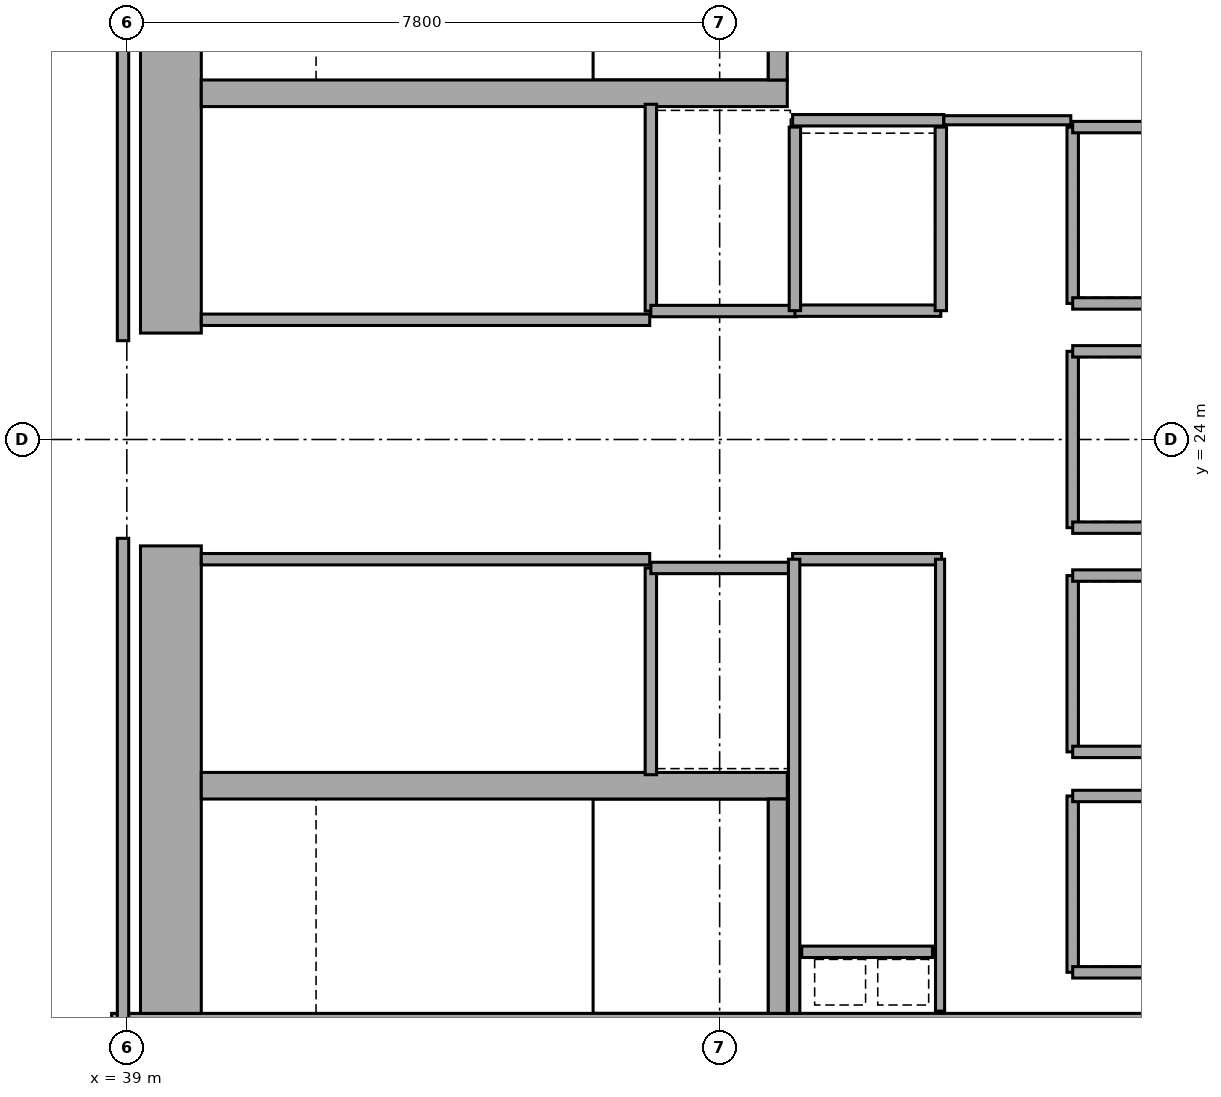
"""IFC4 building model, lengths in metres.
Left out: names, types, materials, properties, quantities, classifications, styles, units other than length and angle.
Written with IfcOpenShell. Run it as: python <this file> out.ifc"""

import sys

from ifc_helpers import new_model, si_unit, direction, frame, frame_2d, origin, place, context, subcontext, project, spatial, rectangle, extrude, element, fill, save


model = new_model("IFC4")
c1 = context("Model", 3, precision=1e-05, world=origin(), true_north=direction((0.0, 1.0)))
c2 = subcontext(c1, "Body", "Model", "MODEL_VIEW")
j1 = project(units=[si_unit("LENGTHUNIT", "METRE"), si_unit("PLANEANGLEUNIT", "RADIAN")], contexts=[c1])
p1 = place(None, origin())
s1 = spatial("IfcSite", under=j1, at=p1, CompositionType="ELEMENT")
p2 = place(p1, origin())
s2 = spatial("IfcBuilding", under=s1, at=p2, CompositionType="ELEMENT")
p3 = place(p2, frame((0.0, 0.0, 112.05)))
s3 = spatial("IfcBuildingStorey", under=s2, at=p3, CompositionType="ELEMENT", Elevation=112.05)
p4 = place(p3, frame((38.8, 16.05, 0.0), z_axis=(0.0, 0.0, 1.0), x_axis=(1.0, 0.0, 0.0)))
e1 = element("IfcWall", 1, at=p4, inside=s3, PredefinedType="SHEAR", context=c2, shape_type="SweptSolid", body=[
    extrude(rectangle(XDim=16.0, YDim=0.8, at=frame_2d((8.0, 0.0))), origin(), (0.0, 0.0, 1.0), 4.56),
])
for number, where, z_axis, x_axis in (
    (2, (39.58, 16.45, 0.0), (0.0, 0.0, 1.0), (0.0, 1.0, 0.0)),
    (3, (39.58, 25.4, 0.0), (0.0, 0.0, 1.0), (0.0, 1.0, 0.0)),
):
    element("IfcWall", number, at=place(p3, frame(where, z_axis=z_axis, x_axis=x_axis)), inside=s3, PredefinedType="SHEAR", context=c2, shape_type="SweptSolid", body=[
        extrude(rectangle(XDim=6.15, YDim=0.8, at=frame_2d((3.075, 0.0))), origin(), (0.0, 0.0, 1.0), 4.56),
    ])
p5 = place(p3, frame((39.98, 28.555, 0.0), z_axis=(0.0, 0.0, 1.0), x_axis=(1.0, 0.0, 0.0)))
e4 = element("IfcWall", 4, at=p5, inside=s3, PredefinedType="SHEAR", context=c2, shape_type="SweptSolid", body=[
    extrude(rectangle(XDim=7.71, YDim=0.35, at=frame_2d((3.855, 0.0))), origin(), (0.0, 0.0, 1.0), 4.56),
])
p6 = place(p5, frame((0.25, 0.0, 0.0)))
e5 = element("IfcOpeningElement", 5, at=p6, cuts=e4, PredefinedType="OPENING", context=c2, shape_type="SweptSolid", body=[
    extrude(rectangle(XDim=1.1, YDim=2.15, at=frame_2d((0.55, 1.075))), frame((0.0, 0.185, 0.0), z_axis=(0.0, -1.0, 0.0), x_axis=(1.0, 0.0, 0.0)), (0.0, 0.0, 1.0), 0.37),
])
p7 = place(p3, frame((39.98, 19.445, 0.0), z_axis=(0.0, 0.0, 1.0), x_axis=(1.0, 0.0, 0.0)))
e6 = element("IfcWall", 6, at=p7, inside=s3, PredefinedType="SHEAR", context=c2, shape_type="SweptSolid", body=[
    extrude(rectangle(XDim=7.71, YDim=0.35, at=frame_2d((3.855, 0.0))), origin(), (0.0, 0.0, 1.0), 4.56),
])
p8 = place(p7, frame((0.25, 0.0, 0.0)))
e7 = element("IfcOpeningElement", 7, at=p8, cuts=e6, PredefinedType="OPENING", context=c2, shape_type="SweptSolid", body=[
    extrude(rectangle(XDim=1.1, YDim=2.15, at=frame_2d((0.55, 1.075))), frame((0.0, 0.185, 0.0), z_axis=(0.0, -1.0, 0.0), x_axis=(1.0, 0.0, 0.0)), (0.0, 0.0, 1.0), 0.37),
])
for number, where, z_axis, x_axis in (
    (8, (47.565, 28.73, 0.0), (0.0, 0.0, 1.0), (0.0, 1.0, 0.0)),
    (9, (47.565, 16.45, 0.0), (0.0, 0.0, 1.0), (0.0, 1.0, 0.0)),
):
    element("IfcWall", number, at=place(p3, frame(where, z_axis=z_axis, x_axis=x_axis)), inside=s3, PredefinedType="SHEAR", context=c2, shape_type="SweptSolid", body=[
        extrude(rectangle(XDim=2.82, YDim=0.25, at=frame_2d((1.41, 0.0))), origin(), (0.0, 0.0, 1.0), 4.56),
    ])
p9 = place(p3, frame((39.98, 25.575, 0.0), z_axis=(0.0, 0.0, 1.0), x_axis=(1.0, 0.0, 0.0)))
e10 = element("IfcWall", 10, at=p9, inside=s3, PredefinedType="PARTITIONING", context=c2, shape_type="SweptSolid", body=[
    extrude(rectangle(XDim=5.9, YDim=0.15, at=frame_2d((2.95, 0.0))), origin(), (0.0, 0.0, 1.0), 4.56),
])
p10 = place(p9, frame((2.35, 0.0, 0.0)))
e11 = element("IfcOpeningElement", 11, at=p10, cuts=e10, PredefinedType="OPENING", context=c2, shape_type="SweptSolid", body=[
    extrude(rectangle(XDim=1.05, YDim=2.15, at=frame_2d((0.525, 1.075))), frame((0.0, 0.085, 0.0), z_axis=(0.0, -1.0, 0.0), x_axis=(1.0, 0.0, 0.0)), (0.0, 0.0, 1.0), 0.17),
])
p11 = place(p3, frame((39.98, 22.425, 0.0), z_axis=(0.0, 0.0, 1.0), x_axis=(1.0, 0.0, 0.0)))
e12 = element("IfcWall", 12, at=p11, inside=s3, PredefinedType="PARTITIONING", context=c2, shape_type="SweptSolid", body=[
    extrude(rectangle(XDim=5.9, YDim=0.15, at=frame_2d((2.95, 0.0))), origin(), (0.0, 0.0, 1.0), 4.56),
])
p12 = place(p11, frame((2.35, 0.0, 0.0)))
e13 = element("IfcOpeningElement", 13, at=p12, cuts=e12, PredefinedType="OPENING", context=c2, shape_type="SweptSolid", body=[
    extrude(rectangle(XDim=1.05, YDim=2.15, at=frame_2d((0.525, 1.075))), frame((0.0, 0.085, 0.0), z_axis=(0.0, -1.0, 0.0), x_axis=(1.0, 0.0, 0.0)), (0.0, 0.0, 1.0), 0.17),
])
p13 = place(p3, frame((45.895, 25.69, 0.0), z_axis=(0.0, 0.0, 1.0), x_axis=(0.0, 1.0, 0.0)))
e14 = element("IfcWall", 14, at=p13, inside=s3, PredefinedType="PARTITIONING", context=c2, shape_type="SweptSolid", body=[
    extrude(rectangle(XDim=2.72, YDim=0.15, at=frame_2d((1.36, 0.0))), origin(), (0.0, 0.0, 1.0), 4.56),
])
p14 = place(p13, frame((0.81, 0.0, 0.0)))
e15 = element("IfcOpeningElement", 15, at=p14, cuts=e14, PredefinedType="OPENING", context=c2, shape_type="SweptSolid", body=[
    extrude(rectangle(XDim=1.1, YDim=2.15, at=frame_2d((0.55, 1.075))), frame((0.0, 0.085, 0.0), z_axis=(0.0, -1.0, 0.0), x_axis=(1.0, 0.0, 0.0)), (0.0, 0.0, 1.0), 0.17),
])
p15 = place(p3, frame((45.895, 25.69, 0.0), z_axis=(0.0, 0.0, 1.0), x_axis=(1.0, 0.0, 0.0)))
e16 = element("IfcWall", 16, at=p15, inside=s3, PredefinedType="PARTITIONING", context=c2, shape_type="SweptSolid", body=[
    extrude(rectangle(XDim=1.915, YDim=0.15, at=frame_2d((0.958, 0.0))), origin(), (0.0, 0.0, 1.0), 4.56),
])
p16 = place(p3, frame((45.895, 19.59, 0.0), z_axis=(0.0, 0.0, 1.0), x_axis=(0.0, 1.0, 0.0)))
e17 = element("IfcWall", 17, at=p16, inside=s3, PredefinedType="PARTITIONING", context=c2, shape_type="SweptSolid", body=[
    extrude(rectangle(XDim=2.72, YDim=0.15, at=frame_2d((1.36, 0.0))), origin(), (0.0, 0.0, 1.0), 4.56),
])
p17 = place(p16, frame((0.81, 0.0, 0.0)))
e18 = element("IfcOpeningElement", 18, at=p17, cuts=e17, PredefinedType="OPENING", context=c2, shape_type="SweptSolid", body=[
    extrude(rectangle(XDim=1.1, YDim=2.15, at=frame_2d((0.55, 1.075))), frame((0.0, 0.085, 0.0), z_axis=(0.0, -1.0, 0.0), x_axis=(1.0, 0.0, 0.0)), (0.0, 0.0, 1.0), 0.17),
])
p18 = place(p3, frame((45.895, 22.31, 0.0), z_axis=(0.0, 0.0, 1.0), x_axis=(1.0, 0.0, 0.0)))
e19 = element("IfcWall", 19, at=p18, inside=s3, PredefinedType="PARTITIONING", context=c2, shape_type="SweptSolid", body=[
    extrude(rectangle(XDim=1.915, YDim=0.15, at=frame_2d((0.958, 0.0))), origin(), (0.0, 0.0, 1.0), 4.56),
])
p19 = place(p3, frame((47.79, 25.695, 0.0), z_axis=(0.0, 0.0, 1.0), x_axis=(1.0, 0.0, 0.0)))
e20 = element("IfcWall", 20, at=p19, inside=s3, PredefinedType="PARTITIONING", context=c2, shape_type="SweptSolid", body=[
    extrude(rectangle(XDim=1.92, YDim=0.15, at=frame_2d((0.96, 0.0))), origin(), (0.0, 0.0, 1.0), 4.56),
])
p20 = place(p19, frame((0.41, 0.0, 0.0)))
e21 = element("IfcOpeningElement", 21, at=p20, cuts=e20, PredefinedType="OPENING", context=c2, shape_type="SweptSolid", body=[
    extrude(rectangle(XDim=1.1, YDim=2.15, at=frame_2d((0.55, 1.075))), frame((0.0, 0.085, 0.0), z_axis=(0.0, -1.0, 0.0), x_axis=(1.0, 0.0, 0.0)), (0.0, 0.0, 1.0), 0.17),
])
for number, where, z_axis, x_axis in (
    (22, (47.79, 25.695, 0.0), (0.0, 0.0, 1.0), (0.0, 1.0, 0.0)),
    (23, (49.71, 25.695, 0.0), (0.0, 0.0, 1.0), (0.0, 1.0, 0.0)),
):
    element("IfcWall", number, at=place(p3, frame(where, z_axis=z_axis, x_axis=x_axis)), inside=s3, PredefinedType="PARTITIONING", context=c2, shape_type="SweptSolid", body=[
        extrude(rectangle(XDim=2.415, YDim=0.15, at=frame_2d((1.208, 0.0))), origin(), (0.0, 0.0, 1.0), 4.56),
    ])
p21 = place(p3, frame((51.445, 25.79, 0.0), z_axis=(0.0, 0.0, 1.0), x_axis=(0.0, 1.0, 0.0)))
e24 = element("IfcWall", 24, at=p21, inside=s3, PredefinedType="PARTITIONING", context=c2, shape_type="SweptSolid", body=[
    extrude(rectangle(XDim=2.32, YDim=0.15, at=frame_2d((1.16, 0.0))), origin(), (0.0, 0.0, 1.0), 4.56),
])
p22 = place(p21, frame((0.61, 0.0, 0.0)))
e25 = element("IfcOpeningElement", 25, at=p22, cuts=e24, PredefinedType="OPENING", context=c2, shape_type="SweptSolid", body=[
    extrude(rectangle(XDim=1.1, YDim=2.15, at=frame_2d((0.55, 1.075))), frame((0.0, 0.085, 0.0), z_axis=(0.0, -1.0, 0.0), x_axis=(1.0, 0.0, 0.0)), (0.0, 0.0, 1.0), 0.17),
])
for number, where, z_axis, x_axis in (
    (26, (51.445, 25.79, 0.0), (0.0, 0.0, 1.0), (1.0, 0.0, 0.0)),
    (27, (51.445, 28.11, 0.0), (0.0, 0.0, 1.0), (1.0, 0.0, 0.0)),
):
    element("IfcWall", number, at=place(p3, frame(where, z_axis=z_axis, x_axis=x_axis)), inside=s3, PredefinedType="PARTITIONING", context=c2, shape_type="SweptSolid", body=[
        extrude(rectangle(XDim=2.015, YDim=0.15, at=frame_2d((1.007, 0.0))), origin(), (0.0, 0.0, 1.0), 4.56),
    ])
p23 = place(p3, frame((51.445, 19.89, 0.0), z_axis=(0.0, 0.0, 1.0), x_axis=(0.0, 1.0, 0.0)))
e28 = element("IfcWall", 28, at=p23, inside=s3, PredefinedType="PARTITIONING", context=c2, shape_type="SweptSolid", body=[
    extrude(rectangle(XDim=2.32, YDim=0.15, at=frame_2d((1.16, 0.0))), origin(), (0.0, 0.0, 1.0), 4.56),
])
p24 = place(p23, frame((0.61, 0.0, 0.0)))
e29 = element("IfcOpeningElement", 29, at=p24, cuts=e28, PredefinedType="OPENING", context=c2, shape_type="SweptSolid", body=[
    extrude(rectangle(XDim=1.1, YDim=2.15, at=frame_2d((0.55, 1.075))), frame((0.0, 0.085, 0.0), z_axis=(0.0, -1.0, 0.0), x_axis=(1.0, 0.0, 0.0)), (0.0, 0.0, 1.0), 0.17),
])
for number, where, z_axis, x_axis in (
    (30, (51.445, 19.89, 0.0), (0.0, 0.0, 1.0), (1.0, 0.0, 0.0)),
    (31, (51.445, 22.21, 0.0), (0.0, 0.0, 1.0), (1.0, 0.0, 0.0)),
):
    element("IfcWall", number, at=place(p3, frame(where, z_axis=z_axis, x_axis=x_axis)), inside=s3, PredefinedType="PARTITIONING", context=c2, shape_type="SweptSolid", body=[
        extrude(rectangle(XDim=2.015, YDim=0.15, at=frame_2d((1.007, 0.0))), origin(), (0.0, 0.0, 1.0), 4.56),
    ])
p25 = place(p3, frame((51.445, 22.84, 0.0), z_axis=(0.0, 0.0, 1.0), x_axis=(0.0, 1.0, 0.0)))
e32 = element("IfcWall", 32, at=p25, inside=s3, PredefinedType="PARTITIONING", context=c2, shape_type="SweptSolid", body=[
    extrude(rectangle(XDim=2.32, YDim=0.15, at=frame_2d((1.16, 0.0))), origin(), (0.0, 0.0, 1.0), 4.56),
])
for number, where, z_axis, x_axis in (
    (33, (51.445, 22.84, 0.0), (0.0, 0.0, 1.0), (1.0, 0.0, 0.0)),
    (34, (51.445, 25.16, 0.0), (0.0, 0.0, 1.0), (1.0, 0.0, 0.0)),
):
    element("IfcWall", number, at=place(p3, frame(where, z_axis=z_axis, x_axis=x_axis)), inside=s3, PredefinedType="PARTITIONING", context=c2, shape_type="SweptSolid", body=[
        extrude(rectangle(XDim=2.015, YDim=0.15, at=frame_2d((1.007, 0.0))), origin(), (0.0, 0.0, 1.0), 4.56),
    ])
p26 = place(p3, frame((51.445, 16.99, 0.0), z_axis=(0.0, 0.0, 1.0), x_axis=(0.0, 1.0, 0.0)))
e35 = element("IfcWall", 35, at=p26, inside=s3, PredefinedType="PARTITIONING", context=c2, shape_type="SweptSolid", body=[
    extrude(rectangle(XDim=2.32, YDim=0.15, at=frame_2d((1.16, 0.0))), origin(), (0.0, 0.0, 1.0), 4.56),
])
p27 = place(p26, frame((0.61, 0.0, 0.0)))
e36 = element("IfcOpeningElement", 36, at=p27, cuts=e35, PredefinedType="OPENING", context=c2, shape_type="SweptSolid", body=[
    extrude(rectangle(XDim=1.1, YDim=2.15, at=frame_2d((0.55, 1.075))), frame((0.0, 0.085, 0.0), z_axis=(0.0, -1.0, 0.0), x_axis=(1.0, 0.0, 0.0)), (0.0, 0.0, 1.0), 0.17),
])
for number, where, z_axis, x_axis in (
    (37, (51.445, 16.99, 0.0), (0.0, 0.0, 1.0), (1.0, 0.0, 0.0)),
    (38, (51.445, 19.31, 0.0), (0.0, 0.0, 1.0), (1.0, 0.0, 0.0)),
):
    element("IfcWall", number, at=place(p3, frame(where, z_axis=z_axis, x_axis=x_axis)), inside=s3, PredefinedType="PARTITIONING", context=c2, shape_type="SweptSolid", body=[
        extrude(rectangle(XDim=2.015, YDim=0.15, at=frame_2d((1.007, 0.0))), origin(), (0.0, 0.0, 1.0), 4.56),
    ])
p28 = place(p3, frame((47.88, 17.26, 0.0), z_axis=(0.0, 0.0, 1.0), x_axis=(1.0, 0.0, 0.0)))
e39 = element("IfcWall", 39, at=p28, inside=s3, PredefinedType="PARTITIONING", context=c2, shape_type="SweptSolid", body=[
    extrude(rectangle(XDim=1.72, YDim=0.15, at=frame_2d((0.86, 0.0))), origin(), (0.0, 0.0, 1.0), 4.56),
])
p29 = place(p28, frame((0.42, 0.0, 0.0)))
e40 = element("IfcOpeningElement", 40, at=p29, cuts=e39, PredefinedType="OPENING", context=c2, shape_type="SweptSolid", body=[
    extrude(rectangle(XDim=0.85, YDim=2.15, at=frame_2d((0.425, 1.075))), frame((0.0, 0.085, 0.0), z_axis=(0.0, -1.0, 0.0), x_axis=(1.0, 0.0, 0.0)), (0.0, 0.0, 1.0), 0.17),
])
p30 = place(p3, frame((47.76, 22.425, 0.0), z_axis=(0.0, 0.0, 1.0), x_axis=(1.0, 0.0, 0.0)))
e41 = element("IfcWall", 41, at=p30, inside=s3, PredefinedType="PARTITIONING", context=c2, shape_type="SweptSolid", body=[
    extrude(rectangle(XDim=1.96, YDim=0.15, at=frame_2d((0.98, 0.0))), origin(), (0.0, 0.0, 1.0), 4.56),
])
p31 = place(p3, frame((47.78, 16.45, 0.0), z_axis=(0.0, 0.0, 1.0), x_axis=(0.0, 1.0, 0.0)))
e42 = element("IfcWall", 42, at=p31, inside=s3, PredefinedType="PARTITIONING", context=c2, shape_type="SweptSolid", body=[
    extrude(rectangle(XDim=5.975, YDim=0.15, at=frame_2d((2.988, 0.0))), origin(), (0.0, 0.0, 1.0), 4.56),
])
p32 = place(p3, frame((49.7, 16.48, 0.0), z_axis=(0.0, 0.0, 1.0), x_axis=(0.0, 1.0, 0.0)))
e43 = element("IfcWall", 43, at=p32, inside=s3, PredefinedType="PARTITIONING", context=c2, shape_type="SweptSolid", body=[
    extrude(rectangle(XDim=5.945, YDim=0.12, at=frame_2d((2.973, 0.0))), origin(), (0.0, 0.0, 1.0), 4.56),
])
p33 = place(p32, frame((3.35, 0.0, 0.0)))
e44 = element("IfcOpeningElement", 44, at=p33, cuts=e43, PredefinedType="OPENING", context=c2, shape_type="SweptSolid", body=[
    extrude(rectangle(XDim=0.95, YDim=2.15, at=frame_2d((0.475, 1.075))), frame((0.0, 0.07, 0.0), z_axis=(0.0, -1.0, 0.0), x_axis=(1.0, 0.0, 0.0)), (0.0, 0.0, 1.0), 0.14),
])
p34 = place(p3, frame((47.76, 28.2, 0.0), z_axis=(0.0, 0.0, 1.0), x_axis=(1.0, 0.0, 0.0)))
e45 = element("IfcWall", 45, at=p34, inside=s3, PredefinedType="PARTITIONING", context=c2, shape_type="SweptSolid", body=[
    extrude(rectangle(XDim=1.99, YDim=0.15, at=frame_2d((0.995, 0.0))), origin(), (0.0, 0.0, 1.0), 4.56),
])
p35 = place(p3, frame((49.75, 28.2, 0.0), z_axis=(0.0, 0.0, 1.0), x_axis=(1.0, 0.0, 0.0)))
e46 = element("IfcWall", 46, at=p35, inside=s3, PredefinedType="PARTITIONING", context=c2, shape_type="SweptSolid", body=[
    extrude(rectangle(XDim=1.67, YDim=0.12, at=frame_2d((0.835, 0.0))), origin(), (0.0, 0.0, 1.0), 4.56),
])
p36 = place(p35, frame((0.42, 0.0, 0.0)))
e47 = element("IfcOpeningElement", 47, at=p36, cuts=e46, PredefinedType="OPENING", context=c2, shape_type="SweptSolid", body=[
    extrude(rectangle(XDim=0.85, YDim=2.15, at=frame_2d((0.425, 1.075))), frame((0.0, 0.07, 0.0), z_axis=(0.0, -1.0, 0.0), x_axis=(1.0, 0.0, 0.0)), (0.0, 0.0, 1.0), 0.14),
])
for number, where, z_axis, x_axis in (
    (48, (38.95, 14.5, 0.0), (0.0, 0.0, 1.0), (0.0, 1.0, 0.0)),
    (49, (38.95, 25.3, 0.0), (0.0, 0.0, 1.0), (0.0, 1.0, 0.0)),
):
    element("IfcWall", number, at=place(p3, frame(where, z_axis=z_axis, x_axis=x_axis)), inside=s3, PredefinedType="PARTITIONING", context=c2, shape_type="SweptSolid", body=[
        extrude(rectangle(XDim=8.2, YDim=0.15, at=frame_2d((4.1, 0.0))), origin(), (0.0, 0.0, 1.0), 3.94),
    ])
p37 = place(p10, origin())
e50 = element("IfcDoor", 50, at=p37, inside=s3, OperationType="SINGLE_SWING_LEFT", PredefinedType="DOOR", context=c2, shape_type="SweptSolid", body=[
    extrude(rectangle(XDim=1.05, YDim=2.15, at=frame_2d((0.525, 1.075))), frame((0.0, 0.025, 0.0), z_axis=(0.0, -1.0, 0.0), x_axis=(1.0, 0.0, 0.0)), (0.0, 0.0, 1.0), 0.05),
])
fill(e11, e50)
p38 = place(p12, frame((1.05, 0.0, 0.0), z_axis=(0.0, 0.0, 1.0), x_axis=(-1.0, 0.0, 0.0)))
e51 = element("IfcDoor", 51, at=p38, inside=s3, OperationType="SINGLE_SWING_RIGHT", PredefinedType="DOOR", context=c2, shape_type="SweptSolid", body=[
    extrude(rectangle(XDim=1.05, YDim=2.15, at=frame_2d((0.525, 1.075))), frame((0.0, 0.025, 0.0), z_axis=(0.0, -1.0, 0.0), x_axis=(1.0, 0.0, 0.0)), (0.0, 0.0, 1.0), 0.05),
])
fill(e13, e51)
p39 = place(p14, frame((1.1, 0.0, 0.0), z_axis=(0.0, 0.0, 1.0), x_axis=(-1.0, 0.0, 0.0)))
e52 = element("IfcDoor", 52, at=p39, inside=s3, OperationType="DOUBLE_DOOR_SLIDING", PredefinedType="DOOR", context=c2, shape_type="SweptSolid", body=[
    extrude(rectangle(XDim=1.1, YDim=2.15, at=frame_2d((0.55, 1.075))), frame((0.0, 0.025, 0.0), z_axis=(0.0, -1.0, 0.0), x_axis=(1.0, 0.0, 0.0)), (0.0, 0.0, 1.0), 0.05),
])
fill(e15, e52)
p40 = place(p17, frame((1.1, 0.0, 0.0), z_axis=(0.0, 0.0, 1.0), x_axis=(-1.0, 0.0, 0.0)))
e53 = element("IfcDoor", 53, at=p40, inside=s3, OperationType="DOUBLE_DOOR_SLIDING", PredefinedType="DOOR", context=c2, shape_type="SweptSolid", body=[
    extrude(rectangle(XDim=1.1, YDim=2.15, at=frame_2d((0.55, 1.075))), frame((0.0, 0.025, 0.0), z_axis=(0.0, -1.0, 0.0), x_axis=(1.0, 0.0, 0.0)), (0.0, 0.0, 1.0), 0.05),
])
fill(e18, e53)
p41 = place(p20, frame((1.1, 0.0, 0.0), z_axis=(0.0, 0.0, 1.0), x_axis=(-1.0, 0.0, 0.0)))
e54 = element("IfcDoor", 54, at=p41, inside=s3, OperationType="DOUBLE_DOOR_SLIDING", PredefinedType="DOOR", context=c2, shape_type="SweptSolid", body=[
    extrude(rectangle(XDim=1.1, YDim=2.15, at=frame_2d((0.55, 1.075))), frame((0.0, 0.025, 0.0), z_axis=(0.0, -1.0, 0.0), x_axis=(1.0, 0.0, 0.0)), (0.0, 0.0, 1.0), 0.05),
])
fill(e21, e54)
p42 = place(p22, frame((1.1, 0.0, 0.0), z_axis=(0.0, 0.0, 1.0), x_axis=(-1.0, 0.0, 0.0)))
e55 = element("IfcDoor", 55, at=p42, inside=s3, OperationType="DOUBLE_DOOR_SLIDING", PredefinedType="DOOR", context=c2, shape_type="SweptSolid", body=[
    extrude(rectangle(XDim=1.1, YDim=2.15, at=frame_2d((0.55, 1.075))), frame((0.0, 0.025, 0.0), z_axis=(0.0, -1.0, 0.0), x_axis=(1.0, 0.0, 0.0)), (0.0, 0.0, 1.0), 0.05),
])
fill(e25, e55)
p43 = place(p24, frame((1.1, 0.0, 0.0), z_axis=(0.0, 0.0, 1.0), x_axis=(-1.0, 0.0, 0.0)))
e56 = element("IfcDoor", 56, at=p43, inside=s3, OperationType="DOUBLE_DOOR_SLIDING", PredefinedType="DOOR", context=c2, shape_type="SweptSolid", body=[
    extrude(rectangle(XDim=1.1, YDim=2.15, at=frame_2d((0.55, 1.075))), frame((0.0, 0.025, 0.0), z_axis=(0.0, -1.0, 0.0), x_axis=(1.0, 0.0, 0.0)), (0.0, 0.0, 1.0), 0.05),
])
fill(e29, e56)
p44 = place(p27, frame((1.1, 0.0, 0.0), z_axis=(0.0, 0.0, 1.0), x_axis=(-1.0, 0.0, 0.0)))
e57 = element("IfcDoor", 57, at=p44, inside=s3, OperationType="DOUBLE_DOOR_SLIDING", PredefinedType="DOOR", context=c2, shape_type="SweptSolid", body=[
    extrude(rectangle(XDim=1.1, YDim=2.15, at=frame_2d((0.55, 1.075))), frame((0.0, 0.025, 0.0), z_axis=(0.0, -1.0, 0.0), x_axis=(1.0, 0.0, 0.0)), (0.0, 0.0, 1.0), 0.05),
])
fill(e36, e57)
p45 = place(p29, origin())
e58 = element("IfcDoor", 58, at=p45, inside=s3, OperationType="SINGLE_SWING_LEFT", PredefinedType="TRAPDOOR", context=c2, shape_type="SweptSolid", body=[
    extrude(rectangle(XDim=0.85, YDim=2.15, at=frame_2d((0.425, 1.075))), frame((0.0, 0.025, 0.0), z_axis=(0.0, -1.0, 0.0), x_axis=(1.0, 0.0, 0.0)), (0.0, 0.0, 1.0), 0.05),
])
fill(e40, e58)
p46 = place(p33, frame((0.95, 0.0, 0.0), z_axis=(0.0, 0.0, 1.0), x_axis=(-1.0, 0.0, 0.0)))
e59 = element("IfcDoor", 59, at=p46, inside=s3, OperationType="SINGLE_SWING_LEFT", PredefinedType="DOOR", context=c2, shape_type="SweptSolid", body=[
    extrude(rectangle(XDim=0.95, YDim=2.15, at=frame_2d((0.475, 1.075))), frame((0.0, 0.025, 0.0), z_axis=(0.0, -1.0, 0.0), x_axis=(1.0, 0.0, 0.0)), (0.0, 0.0, 1.0), 0.05),
])
fill(e44, e59)
p47 = place(p36, origin())
e60 = element("IfcDoor", 60, at=p47, inside=s3, OperationType="SINGLE_SWING_LEFT", PredefinedType="DOOR", context=c2, shape_type="SweptSolid", body=[
    extrude(rectangle(XDim=0.85, YDim=2.15, at=frame_2d((0.425, 1.075))), frame((0.0, 0.025, 0.0), z_axis=(0.0, -1.0, 0.0), x_axis=(1.0, 0.0, 0.0)), (0.0, 0.0, 1.0), 0.05),
])
fill(e47, e60)
p48 = place(p6, origin())
e61 = element("IfcDoor", 61, at=p48, inside=s3, OperationType="SINGLE_SWING_RIGHT", PredefinedType="DOOR", context=c2, shape_type="SweptSolid", body=[
    extrude(rectangle(XDim=1.1, YDim=2.15, at=frame_2d((0.55, 1.075))), frame((0.0, 0.025, 0.0), z_axis=(0.0, -1.0, 0.0), x_axis=(1.0, 0.0, 0.0)), (0.0, 0.0, 1.0), 0.05),
])
fill(e5, e61)
p49 = place(p8, frame((1.1, 0.0, 0.0), z_axis=(0.0, 0.0, 1.0), x_axis=(-1.0, 0.0, 0.0)))
e62 = element("IfcDoor", 62, at=p49, inside=s3, OperationType="SINGLE_SWING_LEFT", PredefinedType="DOOR", context=c2, shape_type="SweptSolid", body=[
    extrude(rectangle(XDim=1.1, YDim=2.15, at=frame_2d((0.55, 1.075))), frame((0.0, 0.025, 0.0), z_axis=(0.0, -1.0, 0.0), x_axis=(1.0, 0.0, 0.0)), (0.0, 0.0, 1.0), 0.05),
])
fill(e7, e62)
save(model, sys.argv[1])
